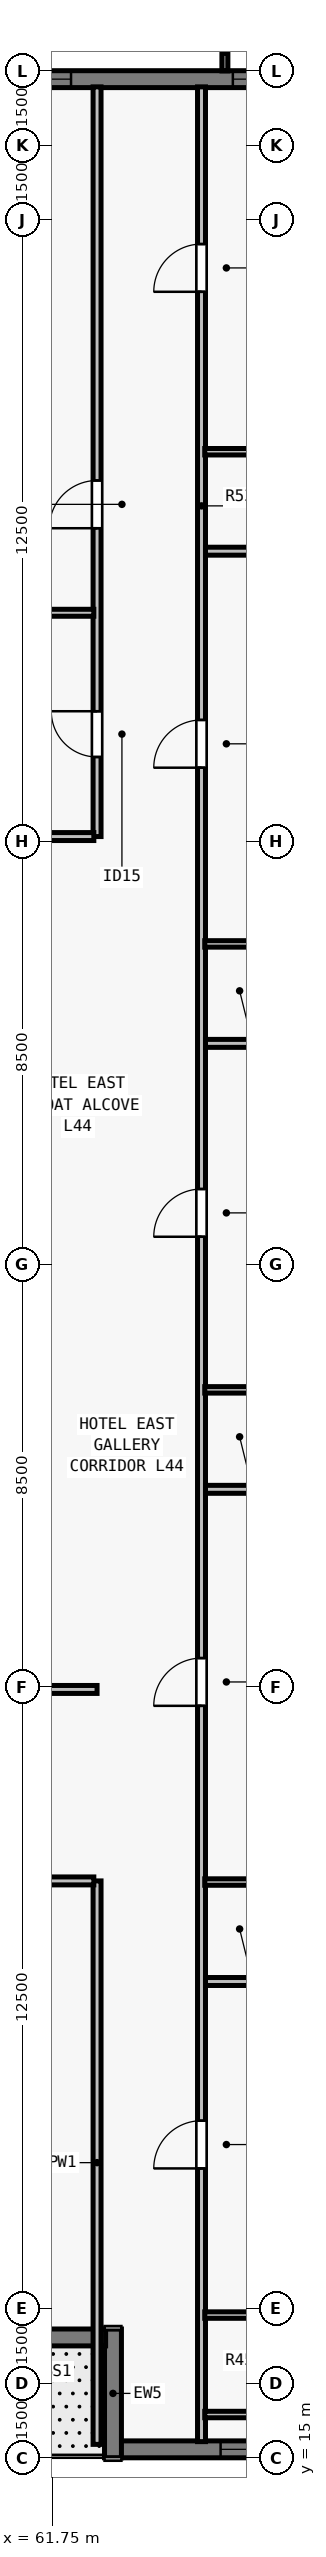
"""IFC4 building model, lengths in metres.
Left out: names, types, materials, properties, quantities, classifications, styles, units other than length and angle.
Written with IfcOpenShell. Run it as: python <this file> out.ifc"""

import sys

from ifc_helpers import new_model, si_unit, direction, frame, frame_2d, origin, place, context, subcontext, project, spatial, rectangle, extrude, element, fill, save


model = new_model("IFC4")
c1 = context("Model", 3, precision=1e-05, world=origin(), true_north=direction((0.0, 1.0)))
c2 = subcontext(c1, "Body", "Model", "MODEL_VIEW")
j1 = project(units=[si_unit("LENGTHUNIT", "METRE"), si_unit("PLANEANGLEUNIT", "RADIAN")], contexts=[c1])
p1 = place(None, origin())
s1 = spatial("IfcSite", under=j1, at=p1, CompositionType="ELEMENT")
p2 = place(p1, origin())
s2 = spatial("IfcBuilding", under=s1, at=p2, CompositionType="ELEMENT")
p3 = place(p2, frame((0.0, 0.0, 162.0)))
s3 = spatial("IfcBuildingStorey", under=s2, at=p3, CompositionType="ELEMENT", Elevation=162.0)
p4 = place(p3, frame((32.0, 62.83, 0.0), z_axis=(0.0, 0.0, 1.0), x_axis=(1.0, 0.0, 0.0)))
e1 = element("IfcWall", 1, at=p4, inside=s3, PredefinedType="SOLIDWALL", context=c2, shape_type="SweptSolid", body=[
    extrude(rectangle(XDim=39.682, YDim=0.34, at=frame_2d((19.841, 0.0))), origin(), (0.0, 0.0, 1.0), 3.28),
])
p5 = place(p4, frame((4.502, 0.0, 0.8)))
e2 = element("IfcOpeningElement", 2, at=p5, cuts=e1, PredefinedType="OPENING", context=c2, shape_type="SweptSolid", body=[
    extrude(rectangle(XDim=1.35, YDim=1.66, at=frame_2d((0.675, 0.83))), frame((0.0, 0.18, 0.0), z_axis=(0.0, -1.0, 0.0), x_axis=(1.0, 0.0, 0.0)), (0.0, 0.0, 1.0), 0.36),
])
p6 = place(p4, frame((8.755, 0.0, 0.8)))
e3 = element("IfcOpeningElement", 3, at=p6, cuts=e1, PredefinedType="OPENING", context=c2, shape_type="SweptSolid", body=[
    extrude(rectangle(XDim=1.75, YDim=1.66, at=frame_2d((0.875, 0.83))), frame((0.0, 0.18, 0.0), z_axis=(0.0, -1.0, 0.0), x_axis=(1.0, 0.0, 0.0)), (0.0, 0.0, 1.0), 0.36),
])
p7 = place(p4, frame((12.059, 0.0, 0.8)))
e4 = element("IfcOpeningElement", 4, at=p7, cuts=e1, PredefinedType="OPENING", context=c2, shape_type="SweptSolid", body=[
    extrude(rectangle(XDim=1.35, YDim=1.66, at=frame_2d((0.675, 0.83))), frame((0.0, 0.18, 0.0), z_axis=(0.0, -1.0, 0.0), x_axis=(1.0, 0.0, 0.0)), (0.0, 0.0, 1.0), 0.36),
])
p8 = place(p4, frame((16.262, 0.0, 0.8)))
e5 = element("IfcOpeningElement", 5, at=p8, cuts=e1, PredefinedType="OPENING", context=c2, shape_type="SweptSolid", body=[
    extrude(rectangle(XDim=1.75, YDim=1.66, at=frame_2d((0.875, 0.83))), frame((0.0, 0.18, 0.0), z_axis=(0.0, -1.0, 0.0), x_axis=(1.0, 0.0, 0.0)), (0.0, 0.0, 1.0), 0.36),
])
p9 = place(p4, frame((19.166, 0.0, 0.8)))
e6 = element("IfcOpeningElement", 6, at=p9, cuts=e1, PredefinedType="OPENING", context=c2, shape_type="SweptSolid", body=[
    extrude(rectangle(XDim=1.35, YDim=1.66, at=frame_2d((0.675, 0.83))), frame((0.0, 0.18, 0.0), z_axis=(0.0, -1.0, 0.0), x_axis=(1.0, 0.0, 0.0)), (0.0, 0.0, 1.0), 0.36),
])
p10 = place(p4, frame((22.07, 0.0, 0.8)))
e7 = element("IfcOpeningElement", 7, at=p10, cuts=e1, PredefinedType="OPENING", context=c2, shape_type="SweptSolid", body=[
    extrude(rectangle(XDim=1.75, YDim=1.66, at=frame_2d((0.875, 0.83))), frame((0.0, 0.18, 0.0), z_axis=(0.0, -1.0, 0.0), x_axis=(1.0, 0.0, 0.0)), (0.0, 0.0, 1.0), 0.36),
])
p11 = place(p4, frame((26.273, 0.0, 0.8)))
e8 = element("IfcOpeningElement", 8, at=p11, cuts=e1, PredefinedType="OPENING", context=c2, shape_type="SweptSolid", body=[
    extrude(rectangle(XDim=1.35, YDim=1.66, at=frame_2d((0.675, 0.83))), frame((0.0, 0.18, 0.0), z_axis=(0.0, -1.0, 0.0), x_axis=(1.0, 0.0, 0.0)), (0.0, 0.0, 1.0), 0.36),
])
p12 = place(p4, frame((28.377, 0.0, 0.8)))
e9 = element("IfcOpeningElement", 9, at=p12, cuts=e1, PredefinedType="OPENING", context=c2, shape_type="SweptSolid", body=[
    extrude(rectangle(XDim=1.75, YDim=1.66, at=frame_2d((0.875, 0.83))), frame((0.0, 0.18, 0.0), z_axis=(0.0, -1.0, 0.0), x_axis=(1.0, 0.0, 0.0)), (0.0, 0.0, 1.0), 0.36),
])
p13 = place(p4, frame((33.38, 0.0, 0.8)))
e10 = element("IfcOpeningElement", 10, at=p13, cuts=e1, PredefinedType="OPENING", context=c2, shape_type="SweptSolid", body=[
    extrude(rectangle(XDim=1.35, YDim=1.66, at=frame_2d((0.675, 0.83))), frame((0.0, 0.18, 0.0), z_axis=(0.0, -1.0, 0.0), x_axis=(1.0, 0.0, 0.0)), (0.0, 0.0, 1.0), 0.36),
])
p14 = place(p3, frame((72.0, 15.17, 0.0), z_axis=(0.0, 0.0, 1.0), x_axis=(-1.0, 0.0, 0.0)))
e11 = element("IfcWall", 11, at=p14, inside=s3, PredefinedType="SOLIDWALL", context=c2, shape_type="SweptSolid", body=[
    extrude(rectangle(XDim=8.882, YDim=0.34, at=frame_2d((4.441, 0.0))), origin(), (0.0, 0.0, 1.0), 3.28),
])
p15 = place(p14, frame((5.516, 0.0, 0.8)))
e12 = element("IfcOpeningElement", 12, at=p15, cuts=e11, PredefinedType="OPENING", context=c2, shape_type="SweptSolid", body=[
    extrude(rectangle(XDim=1.35, YDim=1.66, at=frame_2d((0.675, 0.83))), frame((0.0, 0.18, 0.0), z_axis=(0.0, -1.0, 0.0), x_axis=(1.0, 0.0, 0.0)), (0.0, 0.0, 1.0), 0.36),
])
p16 = place(p3, frame((62.97, 15.0, 0.0), z_axis=(0.0, 0.0, 1.0), x_axis=(0.0, 1.0, 0.0)))
e13 = element("IfcWall", 13, at=p16, inside=s3, PredefinedType="SOLIDWALL", context=c2, shape_type="SweptSolid", body=[
    extrude(rectangle(XDim=2.59, YDim=0.34, at=frame_2d((1.295, 0.0))), origin(), (0.0, 0.0, 1.0), 3.28),
])
p17 = place(p3, frame((62.822, 17.42, 0.0), z_axis=(0.0, 0.0, 1.0), x_axis=(-1.0, 0.0, 0.0)))
e14 = element("IfcWall", 14, at=p17, inside=s3, PredefinedType="SOLIDWALL", context=c2, shape_type="SweptSolid", body=[
    extrude(rectangle(XDim=5.762, YDim=0.34, at=frame_2d((2.881, 0.0))), origin(), (0.0, 0.0, 1.0), 3.28),
])
p18 = place(p17, frame((2.301, 0.0, 0.0)))
e15 = element("IfcOpeningElement", 15, at=p18, cuts=e14, PredefinedType="OPENING", context=c2, shape_type="SweptSolid", body=[
    extrude(rectangle(XDim=1.0, YDim=2.15, at=frame_2d((0.5, 1.075))), frame((0.0, 0.18, 0.0), z_axis=(0.0, -1.0, 0.0), x_axis=(1.0, 0.0, 0.0)), (0.0, 0.0, 1.0), 0.36),
])
p19 = place(p3, frame((64.75, 15.325, 0.0), z_axis=(0.0, 0.0, 1.0), x_axis=(0.0, 1.0, 0.0)))
e16 = element("IfcWall", 16, at=p19, inside=s3, PredefinedType="PARTITIONING", context=c2, shape_type="SweptSolid", body=[
    extrude(rectangle(XDim=47.35, YDim=0.16, at=frame_2d((23.675, 0.0))), origin(), (0.0, 0.0, 1.0), 2.555),
])
p20 = place(p19, frame((5.494, 0.0, 0.0)))
e17 = element("IfcOpeningElement", 17, at=p20, cuts=e16, PredefinedType="OPENING", context=c2, shape_type="SweptSolid", body=[
    extrude(rectangle(XDim=0.96, YDim=2.15, at=frame_2d((0.48, 1.075))), frame((0.0, 0.09, 0.0), z_axis=(0.0, -1.0, 0.0), x_axis=(1.0, 0.0, 0.0)), (0.0, 0.0, 1.0), 0.18),
])
p21 = place(p19, frame((14.796, 0.0, 0.0)))
e18 = element("IfcOpeningElement", 18, at=p21, cuts=e16, PredefinedType="OPENING", context=c2, shape_type="SweptSolid", body=[
    extrude(rectangle(XDim=0.96, YDim=2.15, at=frame_2d((0.48, 1.075))), frame((0.0, 0.09, 0.0), z_axis=(0.0, -1.0, 0.0), x_axis=(1.0, 0.0, 0.0)), (0.0, 0.0, 1.0), 0.18),
])
p22 = place(p19, frame((24.228, 0.0, 0.0)))
e19 = element("IfcOpeningElement", 19, at=p22, cuts=e16, PredefinedType="OPENING", context=c2, shape_type="SweptSolid", body=[
    extrude(rectangle(XDim=0.96, YDim=2.15, at=frame_2d((0.48, 1.075))), frame((0.0, 0.09, 0.0), z_axis=(0.0, -1.0, 0.0), x_axis=(1.0, 0.0, 0.0)), (0.0, 0.0, 1.0), 0.18),
])
p23 = place(p19, frame((33.66, 0.0, 0.0)))
e20 = element("IfcOpeningElement", 20, at=p23, cuts=e16, PredefinedType="OPENING", context=c2, shape_type="SweptSolid", body=[
    extrude(rectangle(XDim=0.96, YDim=2.15, at=frame_2d((0.48, 1.075))), frame((0.0, 0.09, 0.0), z_axis=(0.0, -1.0, 0.0), x_axis=(1.0, 0.0, 0.0)), (0.0, 0.0, 1.0), 0.18),
])
p24 = place(p19, frame((43.229, 0.0, 0.0)))
e21 = element("IfcOpeningElement", 21, at=p24, cuts=e16, PredefinedType="OPENING", context=c2, shape_type="SweptSolid", body=[
    extrude(rectangle(XDim=0.96, YDim=2.15, at=frame_2d((0.48, 1.075))), frame((0.0, 0.09, 0.0), z_axis=(0.0, -1.0, 0.0), x_axis=(1.0, 0.0, 0.0)), (0.0, 0.0, 1.0), 0.18),
])
p25 = place(p3, frame((62.65, 15.27, 0.0), z_axis=(0.0, 0.0, 1.0), x_axis=(0.0, 1.0, 0.0)))
e22 = element("IfcWall", 22, at=p25, inside=s3, PredefinedType="PARTITIONING", context=c2, shape_type="SweptSolid", body=[
    extrude(rectangle(XDim=11.33, YDim=0.16, at=frame_2d((5.665, 0.0))), origin(), (0.0, 0.0, 1.0), 3.28),
])
p26 = place(p3, frame((62.65, 47.6, 0.0), z_axis=(0.0, 0.0, 1.0), x_axis=(0.0, 1.0, 0.0)))
e23 = element("IfcWall", 23, at=p26, inside=s3, PredefinedType="PARTITIONING", context=c2, shape_type="SweptSolid", body=[
    extrude(rectangle(XDim=15.075, YDim=0.16, at=frame_2d((7.538, 0.0))), origin(), (0.0, 0.0, 1.0), 2.555),
])
p27 = place(p26, frame((1.6, 0.0, 0.0)))
e24 = element("IfcOpeningElement", 24, at=p27, cuts=e23, PredefinedType="OPENING", context=c2, shape_type="SweptSolid", body=[
    extrude(rectangle(XDim=0.92, YDim=2.12, at=frame_2d((0.46, 1.06))), frame((0.0, 0.09, 0.0), z_axis=(0.0, -1.0, 0.0), x_axis=(1.0, 0.0, 0.0)), (0.0, 0.0, 1.0), 0.18),
])
p28 = place(p26, frame((6.2, 0.0, 0.0)))
e25 = element("IfcOpeningElement", 25, at=p28, cuts=e23, PredefinedType="OPENING", context=c2, shape_type="SweptSolid", body=[
    extrude(rectangle(XDim=0.96, YDim=2.12, at=frame_2d((0.48, 1.06))), frame((0.0, 0.09, 0.0), z_axis=(0.0, -1.0, 0.0), x_axis=(1.0, 0.0, 0.0)), (0.0, 0.0, 1.0), 0.18),
])
p29 = place(p3, frame((60.765, 30.45, 0.0), z_axis=(0.0, 0.0, 1.0), x_axis=(1.0, 0.0, 0.0)))
e26 = element("IfcWall", 26, at=p29, inside=s3, PredefinedType="PARTITIONING", context=c2, shape_type="SweptSolid", body=[
    extrude(rectangle(XDim=1.885, YDim=0.16, at=frame_2d((0.942, 0.0))), origin(), (0.0, 0.0, 1.0), 3.28),
])
p30 = place(p3, frame((60.765, 47.6, 0.0), z_axis=(0.0, 0.0, 1.0), x_axis=(1.0, 0.0, 0.0)))
e27 = element("IfcWall", 27, at=p30, inside=s3, PredefinedType="PARTITIONING", context=c2, shape_type="SweptSolid", body=[
    extrude(rectangle(XDim=1.82, YDim=0.16, at=frame_2d((0.91, 0.0))), origin(), (0.0, 0.0, 1.0), 3.28),
])
p31 = place(p3, frame((40.515, 26.6, 0.0), z_axis=(0.0, 0.0, 1.0), x_axis=(1.0, 0.0, 0.0)))
e28 = element("IfcWall", 28, at=p31, inside=s3, PredefinedType="PARTITIONING", context=c2, shape_type="SweptSolid", body=[
    extrude(rectangle(XDim=22.07, YDim=0.16, at=frame_2d((11.035, 0.0))), origin(), (0.0, 0.0, 1.0), 3.28),
])
p32 = place(p31, frame((3.072, 0.0, 0.0)))
e29 = element("IfcOpeningElement", 29, at=p32, cuts=e28, PredefinedType="OPENING", context=c2, shape_type="SweptSolid", body=[
    extrude(rectangle(XDim=0.96, YDim=2.15, at=frame_2d((0.48, 1.075))), frame((0.0, 0.09, 0.0), z_axis=(0.0, -1.0, 0.0), x_axis=(1.0, 0.0, 0.0)), (0.0, 0.0, 1.0), 0.18),
])
p33 = place(p31, frame((5.362, 0.0, 0.0)))
e30 = element("IfcOpeningElement", 30, at=p33, cuts=e28, PredefinedType="OPENING", context=c2, shape_type="SweptSolid", body=[
    extrude(rectangle(XDim=0.96, YDim=2.15, at=frame_2d((0.48, 1.075))), frame((0.0, 0.09, 0.0), z_axis=(0.0, -1.0, 0.0), x_axis=(1.0, 0.0, 0.0)), (0.0, 0.0, 1.0), 0.18),
])
p34 = place(p31, frame((11.566, 0.0, 0.0)))
e31 = element("IfcOpeningElement", 31, at=p34, cuts=e28, PredefinedType="OPENING", context=c2, shape_type="SweptSolid", body=[
    extrude(rectangle(XDim=0.96, YDim=2.15, at=frame_2d((0.48, 1.075))), frame((0.0, 0.09, 0.0), z_axis=(0.0, -1.0, 0.0), x_axis=(1.0, 0.0, 0.0)), (0.0, 0.0, 1.0), 0.18),
])
p35 = place(p31, frame((14.178, 0.0, 0.0)))
e32 = element("IfcOpeningElement", 32, at=p35, cuts=e28, PredefinedType="OPENING", context=c2, shape_type="SweptSolid", body=[
    extrude(rectangle(XDim=0.96, YDim=2.15, at=frame_2d((0.48, 1.075))), frame((0.0, 0.09, 0.0), z_axis=(0.0, -1.0, 0.0), x_axis=(1.0, 0.0, 0.0)), (0.0, 0.0, 1.0), 0.18),
])
p36 = place(p31, frame((20.099, 0.0, 0.0)))
e33 = element("IfcOpeningElement", 33, at=p36, cuts=e28, PredefinedType="OPENING", context=c2, shape_type="SweptSolid", body=[
    extrude(rectangle(XDim=0.96, YDim=2.15, at=frame_2d((0.48, 1.075))), frame((0.0, 0.09, 0.0), z_axis=(0.0, -1.0, 0.0), x_axis=(1.0, 0.0, 0.0)), (0.0, 0.0, 1.0), 0.18),
])
p37 = place(p3, frame((53.555, 52.1, 0.0), z_axis=(0.0, 0.0, 1.0), x_axis=(1.0, 0.0, 0.0)))
e34 = element("IfcWall", 34, at=p37, inside=s3, PredefinedType="PARTITIONING", context=c2, shape_type="SweptSolid", body=[
    extrude(rectangle(XDim=9.03, YDim=0.14, at=frame_2d((4.515, 0.0))), origin(), (0.0, 0.0, 1.0), 3.28),
])
for number, where, z_axis, x_axis in (
    (35, (64.815, 15.87, 0.0), (0.0, 0.0, 1.0), (1.0, 0.0, 0.0)),
    (36, (64.815, 17.87, 0.0), (0.0, 0.0, 1.0), (1.0, 0.0, 0.0)),
):
    element("IfcWall", number, at=place(p3, frame(where, z_axis=z_axis, x_axis=x_axis)), inside=s3, PredefinedType="PLUMBINGWALL", context=c2, shape_type="SweptSolid", body=[
        extrude(rectangle(XDim=2.315, YDim=0.13, at=frame_2d((1.157, 0.0))), origin(), (0.0, 0.0, 1.0), 3.28),
    ])
p38 = place(p3, frame((64.83, 24.577, 0.0), z_axis=(0.0, 0.0, 1.0), x_axis=(1.0, 0.0, 0.0)))
e37 = element("IfcWall", 37, at=p38, inside=s3, PredefinedType="PARTITIONING", context=c2, shape_type="SweptSolid", body=[
    extrude(rectangle(XDim=10.845, YDim=0.16, at=frame_2d((5.422, 0.0))), origin(), (0.0, 0.0, 1.0), 2.896),
])
p39 = place(p3, frame((64.815, 26.577, 0.0), z_axis=(0.0, 0.0, 1.0), x_axis=(1.0, 0.0, 0.0)))
e38 = element("IfcWall", 38, at=p39, inside=s3, PredefinedType="PLUMBINGWALL", context=c2, shape_type="SweptSolid", body=[
    extrude(rectangle(XDim=2.315, YDim=0.13, at=frame_2d((1.157, 0.0))), origin(), (0.0, 0.0, 1.0), 2.896),
])
p40 = place(p3, frame((64.83, 34.474, 0.0), z_axis=(0.0, 0.0, 1.0), x_axis=(1.0, 0.0, 0.0)))
e39 = element("IfcWall", 39, at=p40, inside=s3, PredefinedType="PARTITIONING", context=c2, shape_type="SweptSolid", body=[
    extrude(rectangle(XDim=10.845, YDim=0.16, at=frame_2d((5.422, 0.0))), origin(), (0.0, 0.0, 1.0), 3.28),
])
p41 = place(p3, frame((64.815, 36.474, 0.0), z_axis=(0.0, 0.0, 1.0), x_axis=(1.0, 0.0, 0.0)))
e40 = element("IfcWall", 40, at=p41, inside=s3, PredefinedType="PLUMBINGWALL", context=c2, shape_type="SweptSolid", body=[
    extrude(rectangle(XDim=2.315, YDim=0.13, at=frame_2d((1.157, 0.0))), origin(), (0.0, 0.0, 1.0), 3.28),
])
p42 = place(p3, frame((64.83, 43.441, 0.0), z_axis=(0.0, 0.0, 1.0), x_axis=(1.0, 0.0, 0.0)))
e41 = element("IfcWall", 41, at=p42, inside=s3, PredefinedType="PARTITIONING", context=c2, shape_type="SweptSolid", body=[
    extrude(rectangle(XDim=10.845, YDim=0.16, at=frame_2d((5.422, 0.0))), origin(), (0.0, 0.0, 1.0), 3.28),
])
p43 = place(p3, frame((64.815, 45.441, 0.0), z_axis=(0.0, 0.0, 1.0), x_axis=(1.0, 0.0, 0.0)))
e42 = element("IfcWall", 42, at=p43, inside=s3, PredefinedType="PLUMBINGWALL", context=c2, shape_type="SweptSolid", body=[
    extrude(rectangle(XDim=2.315, YDim=0.13, at=frame_2d((1.157, 0.0))), origin(), (0.0, 0.0, 1.0), 3.28),
])
p44 = place(p3, frame((64.83, 53.338, 0.0), z_axis=(0.0, 0.0, 1.0), x_axis=(1.0, 0.0, 0.0)))
e43 = element("IfcWall", 43, at=p44, inside=s3, PredefinedType="PARTITIONING", context=c2, shape_type="SweptSolid", body=[
    extrude(rectangle(XDim=10.845, YDim=0.16, at=frame_2d((5.422, 0.0))), origin(), (0.0, 0.0, 1.0), 2.896),
])
p45 = place(p3, frame((64.815, 55.338, 0.0), z_axis=(0.0, 0.0, 1.0), x_axis=(1.0, 0.0, 0.0)))
e44 = element("IfcWall", 44, at=p45, inside=s3, PredefinedType="PLUMBINGWALL", context=c2, shape_type="SweptSolid", body=[
    extrude(rectangle(XDim=2.315, YDim=0.13, at=frame_2d((1.157, 0.0))), origin(), (0.0, 0.0, 1.0), 3.28),
])
p46 = place(p12, origin())
e45 = element("IfcWindow", 45, at=p46, inside=s3, PartitioningType="SINGLE_PANEL", PredefinedType="WINDOW", context=c2, shape_type="SweptSolid", body=[
    extrude(rectangle(XDim=1.75, YDim=1.66, at=frame_2d((0.875, 0.83))), frame((0.0, -0.05, 0.0), z_axis=(0.0, -1.0, 0.0), x_axis=(1.0, 0.0, 0.0)), (0.0, 0.0, 1.0), 0.06),
])
fill(e9, e45)
p47 = place(p13, origin())
e46 = element("IfcWindow", 46, at=p47, inside=s3, PartitioningType="SINGLE_PANEL", PredefinedType="WINDOW", context=c2, shape_type="SweptSolid", body=[
    extrude(rectangle(XDim=1.35, YDim=1.66, at=frame_2d((0.675, 0.83))), frame((0.0, -0.05, 0.0), z_axis=(0.0, -1.0, 0.0), x_axis=(1.0, 0.0, 0.0)), (0.0, 0.0, 1.0), 0.06),
])
fill(e10, e46)
p48 = place(p15, origin())
e47 = element("IfcWindow", 47, at=p48, inside=s3, PartitioningType="SINGLE_PANEL", PredefinedType="WINDOW", context=c2, shape_type="SweptSolid", body=[
    extrude(rectangle(XDim=1.35, YDim=1.66, at=frame_2d((0.675, 0.83))), frame((0.0, -0.05, 0.0), z_axis=(0.0, -1.0, 0.0), x_axis=(1.0, 0.0, 0.0)), (0.0, 0.0, 1.0), 0.06),
])
fill(e12, e47)
p49 = place(p27, origin())
e48 = element("IfcDoor", 48, at=p49, inside=s3, OperationType="SINGLE_SWING_RIGHT", PredefinedType="DOOR", context=c2, shape_type="SweptSolid", body=[
    extrude(rectangle(XDim=0.92, YDim=2.12, at=frame_2d((0.46, 1.06))), frame((0.0, 0.025, 0.0), z_axis=(0.0, -1.0, 0.0), x_axis=(1.0, 0.0, 0.0)), (0.0, 0.0, 1.0), 0.05),
])
fill(e24, e48)
p50 = place(p28, origin())
e49 = element("IfcDoor", 49, at=p50, inside=s3, OperationType="SINGLE_SWING_LEFT", PredefinedType="DOOR", context=c2, shape_type="SweptSolid", body=[
    extrude(rectangle(XDim=0.96, YDim=2.12, at=frame_2d((0.48, 1.06))), frame((0.0, 0.025, 0.0), z_axis=(0.0, -1.0, 0.0), x_axis=(1.0, 0.0, 0.0)), (0.0, 0.0, 1.0), 0.05),
])
fill(e25, e49)
p51 = place(p20, origin())
e50 = element("IfcDoor", 50, at=p51, inside=s3, OperationType="SINGLE_SWING_LEFT", PredefinedType="DOOR", context=c2, shape_type="SweptSolid", body=[
    extrude(rectangle(XDim=0.96, YDim=2.15, at=frame_2d((0.48, 1.075))), frame((0.0, 0.025, 0.0), z_axis=(0.0, -1.0, 0.0), x_axis=(1.0, 0.0, 0.0)), (0.0, 0.0, 1.0), 0.05),
])
fill(e17, e50)
p52 = place(p21, origin())
e51 = element("IfcDoor", 51, at=p52, inside=s3, OperationType="SINGLE_SWING_LEFT", PredefinedType="DOOR", context=c2, shape_type="SweptSolid", body=[
    extrude(rectangle(XDim=0.96, YDim=2.15, at=frame_2d((0.48, 1.075))), frame((0.0, 0.025, 0.0), z_axis=(0.0, -1.0, 0.0), x_axis=(1.0, 0.0, 0.0)), (0.0, 0.0, 1.0), 0.05),
])
fill(e18, e51)
p53 = place(p22, origin())
e52 = element("IfcDoor", 52, at=p53, inside=s3, OperationType="SINGLE_SWING_LEFT", PredefinedType="DOOR", context=c2, shape_type="SweptSolid", body=[
    extrude(rectangle(XDim=0.96, YDim=2.15, at=frame_2d((0.48, 1.075))), frame((0.0, 0.025, 0.0), z_axis=(0.0, -1.0, 0.0), x_axis=(1.0, 0.0, 0.0)), (0.0, 0.0, 1.0), 0.05),
])
fill(e19, e52)
p54 = place(p23, origin())
e53 = element("IfcDoor", 53, at=p54, inside=s3, OperationType="SINGLE_SWING_LEFT", PredefinedType="DOOR", context=c2, shape_type="SweptSolid", body=[
    extrude(rectangle(XDim=0.96, YDim=2.15, at=frame_2d((0.48, 1.075))), frame((0.0, 0.025, 0.0), z_axis=(0.0, -1.0, 0.0), x_axis=(1.0, 0.0, 0.0)), (0.0, 0.0, 1.0), 0.05),
])
fill(e20, e53)
p55 = place(p24, origin())
e54 = element("IfcDoor", 54, at=p55, inside=s3, OperationType="SINGLE_SWING_LEFT", PredefinedType="DOOR", context=c2, shape_type="SweptSolid", body=[
    extrude(rectangle(XDim=0.96, YDim=2.15, at=frame_2d((0.48, 1.075))), frame((0.0, 0.025, 0.0), z_axis=(0.0, -1.0, 0.0), x_axis=(1.0, 0.0, 0.0)), (0.0, 0.0, 1.0), 0.05),
])
fill(e21, e54)
save(model, sys.argv[1])
